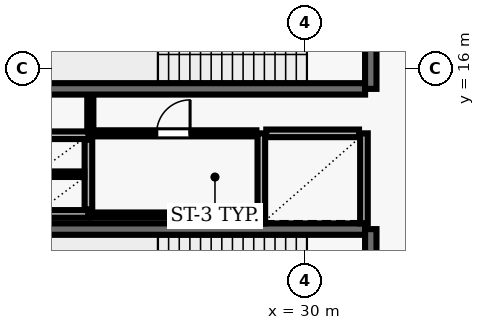
"""IFC4 building model, lengths in metres.
Left out: names, types, materials, properties, quantities, classifications, styles, units other than length and angle.
Written with IfcOpenShell. Run it as: python <this file> out.ifc"""

import sys

from ifc_helpers import new_model, si_unit, direction, frame, frame_2d, origin, place, context, subcontext, project, spatial, rectangle, extrude, element, fill, save


model = new_model("IFC4")
c1 = context("Model", 3, precision=1e-05, world=origin(), true_north=direction((0.0, 1.0)))
c2 = subcontext(c1, "Body", "Model", "MODEL_VIEW")
j1 = project(units=[si_unit("LENGTHUNIT", "METRE"), si_unit("PLANEANGLEUNIT", "RADIAN")], contexts=[c1])
p1 = place(None, origin())
s1 = spatial("IfcSite", under=j1, at=p1, CompositionType="ELEMENT")
p2 = place(p1, origin())
s2 = spatial("IfcBuilding", under=s1, at=p2, CompositionType="ELEMENT")
p3 = place(p2, frame((0.0, 0.0, 10.4)))
s3 = spatial("IfcBuildingStorey", under=s2, at=p3, CompositionType="ELEMENT", Elevation=10.4)
p4 = place(p3, frame((23.22, 15.47, 0.0), z_axis=(0.0, 0.0, 1.0), x_axis=(1.0, 0.0, 0.0)))
e1 = element("IfcWall", 1, at=p4, inside=s3, PredefinedType="SHEAR", context=c2, shape_type="SweptSolid", body=[
    extrude(rectangle(XDim=8.36, YDim=0.3, at=frame_2d((4.18, 0.0))), origin(), (0.0, 0.0, 1.0), 4.92),
])
p5 = place(p3, frame((31.73, 15.47, 0.0), z_axis=(0.0, 0.0, 1.0), x_axis=(0.0, 1.0, 0.0)))
e2 = element("IfcWall", 2, at=p5, inside=s3, PredefinedType="SHEAR", context=c2, shape_type="SweptSolid", body=[
    extrude(rectangle(XDim=3.51, YDim=0.3, at=frame_2d((1.755, 0.0))), origin(), (0.0, 0.0, 1.0), 4.92),
])
p6 = place(p5, frame((1.18, 0.0, 0.0)))
e3 = element("IfcOpeningElement", 3, at=p6, cuts=e2, PredefinedType="OPENING", context=c2, shape_type="SweptSolid", body=[
    extrude(rectangle(XDim=1.15, YDim=2.15, at=frame_2d((0.575, 1.075))), frame((0.0, 0.16, 0.0), z_axis=(0.0, -1.0, 0.0), x_axis=(1.0, 0.0, 0.0)), (0.0, 0.0, 1.0), 0.32),
])
p7 = place(p3, frame((31.58, 11.78, 0.0), z_axis=(0.0, 0.0, 1.0), x_axis=(-1.0, 0.0, 0.0)))
e4 = element("IfcWall", 4, at=p7, inside=s3, PredefinedType="SHEAR", context=c2, shape_type="SweptSolid", body=[
    extrude(rectangle(XDim=8.36, YDim=0.3, at=frame_2d((4.18, 0.0))), origin(), (0.0, 0.0, 1.0), 4.92),
])
p8 = place(p3, frame((31.73, 8.27, 0.0), z_axis=(0.0, 0.0, 1.0), x_axis=(0.0, 1.0, 0.0)))
e5 = element("IfcWall", 5, at=p8, inside=s3, PredefinedType="SHEAR", context=c2, shape_type="SweptSolid", body=[
    extrude(rectangle(XDim=3.51, YDim=0.3, at=frame_2d((1.755, 0.0))), origin(), (0.0, 0.0, 1.0), 4.92),
])
p9 = place(p8, frame((1.18, 0.0, 0.0)))
e6 = element("IfcOpeningElement", 6, at=p9, cuts=e5, PredefinedType="OPENING", context=c2, shape_type="SweptSolid", body=[
    extrude(rectangle(XDim=1.15, YDim=2.15, at=frame_2d((0.575, 1.075))), frame((0.0, 0.16, 0.0), z_axis=(0.0, -1.0, 0.0), x_axis=(1.0, 0.0, 0.0)), (0.0, 0.0, 1.0), 0.32),
])
for number, where, z_axis, x_axis in (
    (7, (28.85, 14.3, 0.0), (0.0, 0.0, 1.0), (0.0, -1.0, 0.0)),
    (8, (31.55, 11.93, 0.0), (0.0, 0.0, 1.0), (0.0, 1.0, 0.0)),
):
    element("IfcWall", number, at=place(p3, frame(where, z_axis=z_axis, x_axis=x_axis)), inside=s3, PredefinedType="SOLIDWALL", context=c2, shape_type="SweptSolid", body=[
        extrude(rectangle(XDim=2.37, YDim=0.2, at=frame_2d((1.185, 0.0))), origin(), (0.0, 0.0, 1.0), 4.92),
    ])
p10 = place(p3, frame((31.42, 14.3, 0.0), z_axis=(0.0, 0.0, 1.0), x_axis=(-1.0, 0.0, 0.0)))
e9 = element("IfcWall", 9, at=p10, inside=s3, PredefinedType="SOLIDWALL", context=c2, shape_type="SweptSolid", body=[
    extrude(rectangle(XDim=2.44, YDim=0.2, at=frame_2d((1.22, 0.0))), origin(), (0.0, 0.0, 1.0), 4.92),
])
for number, where, z_axis, x_axis in (
    (10, (22.9, 14.25, 0.0), (0.0, 0.0, 1.0), (1.0, 0.0, 0.0)),
    (11, (22.9, 12.18, 0.0), (0.0, 0.0, 1.0), (1.0, 0.0, 0.0)),
):
    element("IfcWall", number, at=place(p3, frame(where, z_axis=z_axis, x_axis=x_axis)), inside=s3, PredefinedType="SOLIDWALL", context=c2, shape_type="SweptSolid", body=[
        extrude(rectangle(XDim=1.4, YDim=0.2, at=frame_2d((0.7, 0.0))), origin(), (0.0, 0.0, 1.0), 4.92),
    ])
p11 = place(p3, frame((24.3, 12.3, 0.0), z_axis=(0.0, 0.0, 1.0), x_axis=(0.0, 1.0, 0.0)))
e12 = element("IfcWall", 12, at=p11, inside=s3, PredefinedType="SOLIDWALL", context=c2, shape_type="SweptSolid", body=[
    extrude(rectangle(XDim=1.83, YDim=0.2, at=frame_2d((0.915, 0.0))), origin(), (0.0, 0.0, 1.0), 4.92),
])
p12 = place(p3, frame((23.01, 13.225, 0.0), z_axis=(0.0, 0.0, 1.0), x_axis=(1.0, 0.0, 0.0)))
e13 = element("IfcWall", 13, at=p12, inside=s3, PredefinedType="PARTITIONING", context=c2, shape_type="SweptSolid", body=[
    extrude(rectangle(XDim=1.18, YDim=0.145, at=frame_2d((0.59, 0.0))), origin(), (0.0, 0.0, 1.0), 4.92),
])
p13 = place(p3, frame((24.35, 12.15, 0.0), z_axis=(0.0, 0.0, 1.0), x_axis=(1.0, 0.0, 0.0)))
e14 = element("IfcWall", 14, at=p13, inside=s3, PredefinedType="PARTITIONING", context=c2, shape_type="SweptSolid", body=[
    extrude(rectangle(XDim=4.37, YDim=0.135, at=frame_2d((2.185, 0.0))), origin(), (0.0, 0.0, 1.0), 4.92),
])
p14 = place(p3, frame((24.35, 14.3, 0.0), z_axis=(0.0, 0.0, 1.0), x_axis=(1.0, 0.0, 0.0)))
e15 = element("IfcWall", 15, at=p14, inside=s3, PredefinedType="PARTITIONING", context=c2, shape_type="SweptSolid", body=[
    extrude(rectangle(XDim=4.37, YDim=0.16, at=frame_2d((2.185, 0.0))), origin(), (0.0, 0.0, 1.0), 4.92),
])
p15 = place(p14, frame((1.745, 0.0, 0.0)))
e16 = element("IfcOpeningElement", 16, at=p15, cuts=e15, PredefinedType="OPENING", context=c2, shape_type="SweptSolid", body=[
    extrude(rectangle(XDim=0.88, YDim=2.1, at=frame_2d((0.44, 1.05))), frame((0.0, 0.09, 0.0), z_axis=(0.0, -1.0, 0.0), x_axis=(1.0, 0.0, 0.0)), (0.0, 0.0, 1.0), 0.18),
])
p16 = place(p3, frame((24.35, 15.29, 0.0), z_axis=(0.0, 0.0, 1.0), x_axis=(0.0, -1.0, 0.0)))
e17 = element("IfcWall", 17, at=p16, inside=s3, PredefinedType="PARTITIONING", context=c2, shape_type="SweptSolid", body=[
    extrude(rectangle(XDim=0.915, YDim=0.16, at=frame_2d((0.458, 0.0))), origin(), (0.0, 0.0, 1.0), 4.92),
])
p17 = place(p15, origin())
e18 = element("IfcDoor", 18, at=p17, inside=s3, OperationType="SINGLE_SWING_RIGHT", PredefinedType="DOOR", context=c2, shape_type="SweptSolid", body=[
    extrude(rectangle(XDim=0.88, YDim=2.1, at=frame_2d((0.44, 1.05))), frame((0.0, 0.025, 0.0), z_axis=(0.0, -1.0, 0.0), x_axis=(1.0, 0.0, 0.0)), (0.0, 0.0, 1.0), 0.05),
])
fill(e16, e18)
save(model, sys.argv[1])
